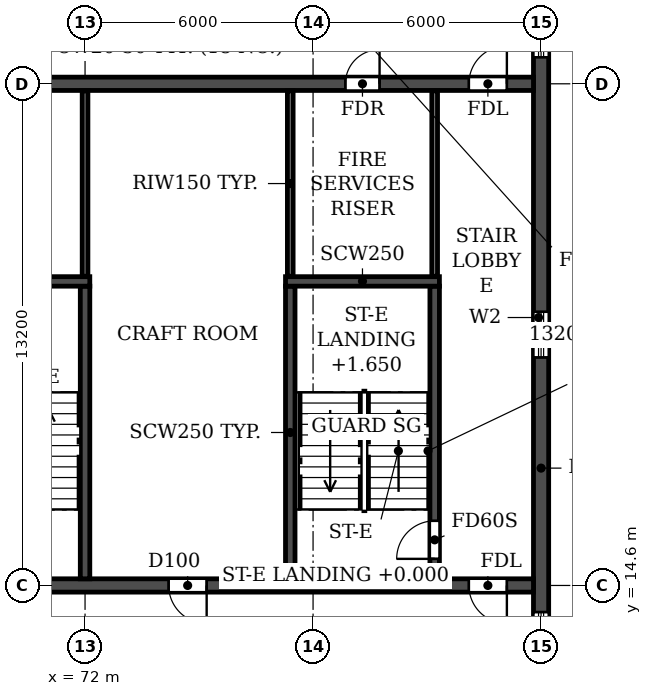
"""IFC4 building model, lengths in metres.
Left out: names, types, materials, properties, quantities, classifications, styles, units other than length and angle.
Written with IfcOpenShell. Run it as: python <this file> out.ifc"""

import sys

from ifc_helpers import new_model, si_unit, direction, frame, frame_2d, origin, place, context, subcontext, project, spatial, rectangle, extrude, element, fill, save


model = new_model("IFC4")
c1 = context("Model", 3, precision=1e-05, world=origin(), true_north=direction((0.0, 1.0)))
c2 = subcontext(c1, "Body", "Model", "MODEL_VIEW")
j1 = project(units=[si_unit("LENGTHUNIT", "METRE"), si_unit("PLANEANGLEUNIT", "RADIAN")], contexts=[c1])
p1 = place(None, origin())
s1 = spatial("IfcSite", under=j1, at=p1, CompositionType="ELEMENT")
p2 = place(p1, origin())
s2 = spatial("IfcBuilding", under=s1, at=p2, CompositionType="ELEMENT")
p3 = place(p2, frame((0.0, 0.0, 257.7)))
s3 = spatial("IfcBuildingStorey", under=s2, at=p3, CompositionType="ELEMENT", Elevation=257.7)
p4 = place(p3, frame((84.0, 4.683, 0.0), z_axis=(0.0, 0.0, 1.0), x_axis=(0.0, 1.0, 0.0)))
e1 = element("IfcWall", 1, at=p4, inside=s3, PredefinedType="SHEAR", context=c2, shape_type="SweptSolid", body=[
    extrude(rectangle(XDim=31.834, YDim=0.4, at=frame_2d((15.917, 0.0))), origin(), (0.0, 0.0, 1.0), 3.0),
])
p5 = place(p4, frame((23.817, 0.0, 0.9)))
e2 = element("IfcOpeningElement", 2, at=p5, cuts=e1, PredefinedType="OPENING", context=c2, shape_type="SweptSolid", body=[
    extrude(rectangle(XDim=1.2, YDim=1.5, at=frame_2d((0.6, 0.75))), frame((0.0, 0.21, 0.0), z_axis=(0.0, -1.0, 0.0), x_axis=(1.0, 0.0, 0.0)), (0.0, 0.0, 1.0), 0.42),
])
p6 = place(p4, frame((8.017, 0.0, 0.9)))
e3 = element("IfcOpeningElement", 3, at=p6, cuts=e1, PredefinedType="OPENING", context=c2, shape_type="SweptSolid", body=[
    extrude(rectangle(XDim=1.2, YDim=1.5, at=frame_2d((0.6, 0.75))), frame((0.0, 0.21, 0.0), z_axis=(0.0, -1.0, 0.0), x_axis=(1.0, 0.0, 0.0)), (0.0, 0.0, 1.0), 0.42),
])
p7 = place(p4, frame((27.694, 0.0, 0.6)))
e4 = element("IfcOpeningElement", 4, at=p7, cuts=e1, PredefinedType="OPENING", context=c2, shape_type="SweptSolid", body=[
    extrude(rectangle(XDim=2.2, YDim=1.8, at=frame_2d((1.1, 0.9))), frame((0.0, 0.21, 0.0), z_axis=(0.0, -1.0, 0.0), x_axis=(1.0, 0.0, 0.0)), (0.0, 0.0, 1.0), 0.42),
])
p8 = place(p4, frame((2.541, 0.0, 0.6)))
e5 = element("IfcOpeningElement", 5, at=p8, cuts=e1, PredefinedType="OPENING", context=c2, shape_type="SweptSolid", body=[
    extrude(rectangle(XDim=2.2, YDim=1.8, at=frame_2d((1.1, 0.9))), frame((0.0, 0.21, 0.0), z_axis=(0.0, -1.0, 0.0), x_axis=(1.0, 0.0, 0.0)), (0.0, 0.0, 1.0), 0.42),
])
p9 = place(p4, frame((15.917, 0.0, 0.9)))
e6 = element("IfcOpeningElement", 6, at=p9, cuts=e1, PredefinedType="OPENING", context=c2, shape_type="SweptSolid", body=[
    extrude(rectangle(XDim=1.2, YDim=1.5, at=frame_2d((0.6, 0.75))), frame((0.0, 0.21, 0.0), z_axis=(0.0, -1.0, 0.0), x_axis=(1.0, 0.0, 0.0)), (0.0, 0.0, 1.0), 0.42),
])
p10 = place(p3, frame((18.2, 14.6, 0.0), z_axis=(0.0, 0.0, 1.0), x_axis=(1.0, 0.0, 0.0)))
e7 = element("IfcWall", 7, at=p10, inside=s3, PredefinedType="SOLIDWALL", context=c2, shape_type="SweptSolid", body=[
    extrude(rectangle(XDim=65.6, YDim=0.35, at=frame_2d((32.8, 0.0))), origin(), (0.0, 0.0, 1.0), 3.0),
])
p11 = place(p10, frame((0.7, 0.0, 0.0)))
e8 = element("IfcOpeningElement", 8, at=p11, cuts=e7, PredefinedType="OPENING", context=c2, shape_type="SweptSolid", body=[
    extrude(rectangle(XDim=1.0, YDim=2.1, at=frame_2d((0.5, 1.05))), frame((0.0, 0.185, 0.0), z_axis=(0.0, -1.0, 0.0), x_axis=(1.0, 0.0, 0.0)), (0.0, 0.0, 1.0), 0.37),
])
p12 = place(p10, frame((8.6, 0.0, 0.0)))
e9 = element("IfcOpeningElement", 9, at=p12, cuts=e7, PredefinedType="OPENING", context=c2, shape_type="SweptSolid", body=[
    extrude(rectangle(XDim=1.0, YDim=2.1, at=frame_2d((0.5, 1.05))), frame((0.0, 0.185, 0.0), z_axis=(0.0, -1.0, 0.0), x_axis=(1.0, 0.0, 0.0)), (0.0, 0.0, 1.0), 0.37),
])
p13 = place(p10, frame((13.2, 0.0, 0.0)))
e10 = element("IfcOpeningElement", 10, at=p13, cuts=e7, PredefinedType="OPENING", context=c2, shape_type="SweptSolid", body=[
    extrude(rectangle(XDim=1.0, YDim=2.1, at=frame_2d((0.5, 1.05))), frame((0.0, 0.185, 0.0), z_axis=(0.0, -1.0, 0.0), x_axis=(1.0, 0.0, 0.0)), (0.0, 0.0, 1.0), 0.37),
])
p14 = place(p10, frame((24.5, 0.0, 0.0)))
e11 = element("IfcOpeningElement", 11, at=p14, cuts=e7, PredefinedType="OPENING", context=c2, shape_type="SweptSolid", body=[
    extrude(rectangle(XDim=1.0, YDim=2.1, at=frame_2d((0.5, 1.05))), frame((0.0, 0.185, 0.0), z_axis=(0.0, -1.0, 0.0), x_axis=(1.0, 0.0, 0.0)), (0.0, 0.0, 1.0), 0.37),
])
p15 = place(p10, frame((28.4, 0.0, 0.0)))
e12 = element("IfcOpeningElement", 12, at=p15, cuts=e7, PredefinedType="OPENING", context=c2, shape_type="SweptSolid", body=[
    extrude(rectangle(XDim=1.0, YDim=2.1, at=frame_2d((0.5, 1.05))), frame((0.0, 0.185, 0.0), z_axis=(0.0, -1.0, 0.0), x_axis=(1.0, 0.0, 0.0)), (0.0, 0.0, 1.0), 0.37),
])
p16 = place(p10, frame((32.3, 0.0, 0.0)))
e13 = element("IfcOpeningElement", 13, at=p16, cuts=e7, PredefinedType="OPENING", context=c2, shape_type="SweptSolid", body=[
    extrude(rectangle(XDim=1.0, YDim=2.1, at=frame_2d((0.5, 1.05))), frame((0.0, 0.185, 0.0), z_axis=(0.0, -1.0, 0.0), x_axis=(1.0, 0.0, 0.0)), (0.0, 0.0, 1.0), 0.37),
])
p17 = place(p10, frame((34.9, 0.0, 0.0)))
e14 = element("IfcOpeningElement", 14, at=p17, cuts=e7, PredefinedType="OPENING", context=c2, shape_type="SweptSolid", body=[
    extrude(rectangle(XDim=1.0, YDim=2.1, at=frame_2d((0.5, 1.05))), frame((0.0, 0.185, 0.0), z_axis=(0.0, -1.0, 0.0), x_axis=(1.0, 0.0, 0.0)), (0.0, 0.0, 1.0), 0.37),
])
p18 = place(p10, frame((38.8, 0.0, 0.0)))
e15 = element("IfcOpeningElement", 15, at=p18, cuts=e7, PredefinedType="OPENING", context=c2, shape_type="SweptSolid", body=[
    extrude(rectangle(XDim=1.0, YDim=2.1, at=frame_2d((0.5, 1.05))), frame((0.0, 0.185, 0.0), z_axis=(0.0, -1.0, 0.0), x_axis=(1.0, 0.0, 0.0)), (0.0, 0.0, 1.0), 0.37),
])
p19 = place(p10, frame((51.4, 0.0, 0.0)))
e16 = element("IfcOpeningElement", 16, at=p19, cuts=e7, PredefinedType="OPENING", context=c2, shape_type="SweptSolid", body=[
    extrude(rectangle(XDim=1.0, YDim=2.1, at=frame_2d((0.5, 1.05))), frame((0.0, 0.185, 0.0), z_axis=(0.0, -1.0, 0.0), x_axis=(1.0, 0.0, 0.0)), (0.0, 0.0, 1.0), 0.37),
])
p20 = place(p10, frame((56.0, 0.0, 0.0)))
e17 = element("IfcOpeningElement", 17, at=p20, cuts=e7, PredefinedType="OPENING", context=c2, shape_type="SweptSolid", body=[
    extrude(rectangle(XDim=1.0, YDim=2.1, at=frame_2d((0.5, 1.05))), frame((0.0, 0.185, 0.0), z_axis=(0.0, -1.0, 0.0), x_axis=(1.0, 0.0, 0.0)), (0.0, 0.0, 1.0), 0.37),
])
p21 = place(p10, frame((63.9, 0.0, 0.0)))
e18 = element("IfcOpeningElement", 18, at=p21, cuts=e7, PredefinedType="OPENING", context=c2, shape_type="SweptSolid", body=[
    extrude(rectangle(XDim=1.0, YDim=2.1, at=frame_2d((0.5, 1.05))), frame((0.0, 0.185, 0.0), z_axis=(0.0, -1.0, 0.0), x_axis=(1.0, 0.0, 0.0)), (0.0, 0.0, 1.0), 0.37),
])
p22 = place(p3, frame((18.2, 27.8, 0.0), z_axis=(0.0, 0.0, 1.0), x_axis=(1.0, 0.0, 0.0)))
e19 = element("IfcWall", 19, at=p22, inside=s3, PredefinedType="SOLIDWALL", context=c2, shape_type="SweptSolid", body=[
    extrude(rectangle(XDim=65.6, YDim=0.35, at=frame_2d((32.8, 0.0))), origin(), (0.0, 0.0, 1.0), 3.0),
])
p23 = place(p22, frame((0.7, 0.0, 0.0)))
e20 = element("IfcOpeningElement", 20, at=p23, cuts=e19, PredefinedType="OPENING", context=c2, shape_type="SweptSolid", body=[
    extrude(rectangle(XDim=1.0, YDim=2.1, at=frame_2d((0.5, 1.05))), frame((0.0, 0.185, 0.0), z_axis=(0.0, -1.0, 0.0), x_axis=(1.0, 0.0, 0.0)), (0.0, 0.0, 1.0), 0.37),
])
p24 = place(p22, frame((4.05, 0.0, 0.0)))
e21 = element("IfcOpeningElement", 21, at=p24, cuts=e19, PredefinedType="OPENING", context=c2, shape_type="SweptSolid", body=[
    extrude(rectangle(XDim=0.9, YDim=2.1, at=frame_2d((0.45, 1.05))), frame((0.0, 0.185, 0.0), z_axis=(0.0, -1.0, 0.0), x_axis=(1.0, 0.0, 0.0)), (0.0, 0.0, 1.0), 0.37),
])
p25 = place(p22, frame((13.25, 0.0, 0.0)))
e22 = element("IfcOpeningElement", 22, at=p25, cuts=e19, PredefinedType="OPENING", context=c2, shape_type="SweptSolid", body=[
    extrude(rectangle(XDim=0.9, YDim=2.1, at=frame_2d((0.45, 1.05))), frame((0.0, 0.185, 0.0), z_axis=(0.0, -1.0, 0.0), x_axis=(1.0, 0.0, 0.0)), (0.0, 0.0, 1.0), 0.37),
])
p26 = place(p22, frame((19.0, 0.0, 0.0)))
e23 = element("IfcOpeningElement", 23, at=p26, cuts=e19, PredefinedType="OPENING", context=c2, shape_type="SweptSolid", body=[
    extrude(rectangle(XDim=1.0, YDim=2.1, at=frame_2d((0.5, 1.05))), frame((0.0, 0.185, 0.0), z_axis=(0.0, -1.0, 0.0), x_axis=(1.0, 0.0, 0.0)), (0.0, 0.0, 1.0), 0.37),
])
p27 = place(p22, frame((24.2, 0.0, 0.0)))
e24 = element("IfcOpeningElement", 24, at=p27, cuts=e19, PredefinedType="OPENING", context=c2, shape_type="SweptSolid", body=[
    extrude(rectangle(XDim=1.0, YDim=2.1, at=frame_2d((0.5, 1.05))), frame((0.0, 0.185, 0.0), z_axis=(0.0, -1.0, 0.0), x_axis=(1.0, 0.0, 0.0)), (0.0, 0.0, 1.0), 0.37),
])
p28 = place(p22, frame((29.4, 0.0, 0.0)))
e25 = element("IfcOpeningElement", 25, at=p28, cuts=e19, PredefinedType="OPENING", context=c2, shape_type="SweptSolid", body=[
    extrude(rectangle(XDim=1.0, YDim=2.1, at=frame_2d((0.5, 1.05))), frame((0.0, 0.185, 0.0), z_axis=(0.0, -1.0, 0.0), x_axis=(1.0, 0.0, 0.0)), (0.0, 0.0, 1.0), 0.37),
])
p29 = place(p22, frame((32.3, 0.0, 0.0)))
e26 = element("IfcOpeningElement", 26, at=p29, cuts=e19, PredefinedType="OPENING", context=c2, shape_type="SweptSolid", body=[
    extrude(rectangle(XDim=1.0, YDim=2.1, at=frame_2d((0.5, 1.05))), frame((0.0, 0.185, 0.0), z_axis=(0.0, -1.0, 0.0), x_axis=(1.0, 0.0, 0.0)), (0.0, 0.0, 1.0), 0.37),
])
p30 = place(p22, frame((36.5, 0.0, 0.0)))
e27 = element("IfcOpeningElement", 27, at=p30, cuts=e19, PredefinedType="OPENING", context=c2, shape_type="SweptSolid", body=[
    extrude(rectangle(XDim=1.0, YDim=2.1, at=frame_2d((0.5, 1.05))), frame((0.0, 0.185, 0.0), z_axis=(0.0, -1.0, 0.0), x_axis=(1.0, 0.0, 0.0)), (0.0, 0.0, 1.0), 0.37),
])
p31 = place(p22, frame((40.4, 0.0, 0.0)))
e28 = element("IfcOpeningElement", 28, at=p31, cuts=e19, PredefinedType="OPENING", context=c2, shape_type="SweptSolid", body=[
    extrude(rectangle(XDim=1.0, YDim=2.1, at=frame_2d((0.5, 1.05))), frame((0.0, 0.185, 0.0), z_axis=(0.0, -1.0, 0.0), x_axis=(1.0, 0.0, 0.0)), (0.0, 0.0, 1.0), 0.37),
])
p32 = place(p22, frame((43.0, 0.0, 0.0)))
e29 = element("IfcOpeningElement", 29, at=p32, cuts=e19, PredefinedType="OPENING", context=c2, shape_type="SweptSolid", body=[
    extrude(rectangle(XDim=1.0, YDim=2.1, at=frame_2d((0.5, 1.05))), frame((0.0, 0.185, 0.0), z_axis=(0.0, -1.0, 0.0), x_axis=(1.0, 0.0, 0.0)), (0.0, 0.0, 1.0), 0.37),
])
p33 = place(p22, frame((46.65, 0.0, 0.0)))
e30 = element("IfcOpeningElement", 30, at=p33, cuts=e19, PredefinedType="OPENING", context=c2, shape_type="SweptSolid", body=[
    extrude(rectangle(XDim=1.5, YDim=2.1, at=frame_2d((0.75, 1.05))), frame((0.0, 0.185, 0.0), z_axis=(0.0, -1.0, 0.0), x_axis=(1.0, 0.0, 0.0)), (0.0, 0.0, 1.0), 0.37),
])
p34 = place(p22, frame((51.45, 0.0, 0.0)))
e31 = element("IfcOpeningElement", 31, at=p34, cuts=e19, PredefinedType="OPENING", context=c2, shape_type="SweptSolid", body=[
    extrude(rectangle(XDim=0.9, YDim=2.1, at=frame_2d((0.45, 1.05))), frame((0.0, 0.185, 0.0), z_axis=(0.0, -1.0, 0.0), x_axis=(1.0, 0.0, 0.0)), (0.0, 0.0, 1.0), 0.37),
])
p35 = place(p22, frame((60.65, 0.0, 0.0)))
e32 = element("IfcOpeningElement", 32, at=p35, cuts=e19, PredefinedType="OPENING", context=c2, shape_type="SweptSolid", body=[
    extrude(rectangle(XDim=0.9, YDim=2.1, at=frame_2d((0.45, 1.05))), frame((0.0, 0.185, 0.0), z_axis=(0.0, -1.0, 0.0), x_axis=(1.0, 0.0, 0.0)), (0.0, 0.0, 1.0), 0.37),
])
p36 = place(p22, frame((63.9, 0.0, 0.0)))
e33 = element("IfcOpeningElement", 33, at=p36, cuts=e19, PredefinedType="OPENING", context=c2, shape_type="SweptSolid", body=[
    extrude(rectangle(XDim=1.0, YDim=2.1, at=frame_2d((0.5, 1.05))), frame((0.0, 0.185, 0.0), z_axis=(0.0, -1.0, 0.0), x_axis=(1.0, 0.0, 0.0)), (0.0, 0.0, 1.0), 0.37),
])
p37 = place(p3, frame((72.0, 14.775, 0.0), z_axis=(0.0, 0.0, 1.0), x_axis=(0.0, 1.0, 0.0)))
e34 = element("IfcWall", 34, at=p37, inside=s3, PredefinedType="SOLIDWALL", context=c2, shape_type="SweptSolid", body=[
    extrude(rectangle(XDim=7.7, YDim=0.25, at=frame_2d((3.85, 0.0))), origin(), (0.0, 0.0, 1.0), 3.0),
])
p38 = place(p3, frame((68.075, 22.6, 0.0), z_axis=(0.0, 0.0, 1.0), x_axis=(1.0, 0.0, 0.0)))
e35 = element("IfcWall", 35, at=p38, inside=s3, PredefinedType="SOLIDWALL", context=c2, shape_type="SweptSolid", body=[
    extrude(rectangle(XDim=4.05, YDim=0.25, at=frame_2d((2.025, 0.0))), origin(), (0.0, 0.0, 1.0), 3.0),
])
p39 = place(p3, frame((77.4, 14.775, 0.0), z_axis=(0.0, 0.0, 1.0), x_axis=(0.0, 1.0, 0.0)))
e36 = element("IfcWall", 36, at=p39, inside=s3, PredefinedType="SOLIDWALL", context=c2, shape_type="SweptSolid", body=[
    extrude(rectangle(XDim=7.7, YDim=0.25, at=frame_2d((3.85, 0.0))), origin(), (0.0, 0.0, 1.0), 3.0),
])
p40 = place(p3, frame((81.2, 14.775, 0.0), z_axis=(0.0, 0.0, 1.0), x_axis=(0.0, 1.0, 0.0)))
e37 = element("IfcWall", 37, at=p40, inside=s3, PredefinedType="SOLIDWALL", context=c2, shape_type="SweptSolid", body=[
    extrude(rectangle(XDim=7.7, YDim=0.25, at=frame_2d((3.85, 0.0))), origin(), (0.0, 0.0, 1.0), 3.0),
])
p41 = place(p40, frame((0.525, 0.0, 0.0)))
e38 = element("IfcOpeningElement", 38, at=p41, cuts=e37, PredefinedType="OPENING", context=c2, shape_type="SweptSolid", body=[
    extrude(rectangle(XDim=1.0, YDim=2.1, at=frame_2d((0.5, 1.05))), frame((0.0, 0.135, 0.0), z_axis=(0.0, -1.0, 0.0), x_axis=(1.0, 0.0, 0.0)), (0.0, 0.0, 1.0), 0.27),
])
p42 = place(p3, frame((77.275, 22.6, 0.0), z_axis=(0.0, 0.0, 1.0), x_axis=(1.0, 0.0, 0.0)))
e39 = element("IfcWall", 39, at=p42, inside=s3, PredefinedType="SOLIDWALL", context=c2, shape_type="SweptSolid", body=[
    extrude(rectangle(XDim=4.05, YDim=0.25, at=frame_2d((2.025, 0.0))), origin(), (0.0, 0.0, 1.0), 3.0),
])
for number, where, z_axis, x_axis in (
    (40, (72.0, 22.735, 0.0), (0.0, 0.0, 1.0), (0.0, 1.0, 0.0)),
    (41, (77.4, 22.735, 0.0), (0.0, 0.0, 1.0), (0.0, 1.0, 0.0)),
    (42, (81.2, 22.735, 0.0), (0.0, 0.0, 1.0), (0.0, 1.0, 0.0)),
):
    element("IfcWall", number, at=place(p3, frame(where, z_axis=z_axis, x_axis=x_axis)), inside=s3, PredefinedType="PARTITIONING", context=c2, shape_type="SweptSolid", body=[
        extrude(rectangle(XDim=4.88, YDim=0.15, at=frame_2d((2.44, 0.0))), origin(), (0.0, 0.0, 1.0), 3.0),
    ])
p43 = place(p5, origin())
e43 = element("IfcWindow", 43, at=p43, inside=s3, PartitioningType="SINGLE_PANEL", PredefinedType="WINDOW", context=c2, shape_type="SweptSolid", body=[
    extrude(rectangle(XDim=1.2, YDim=1.5, at=frame_2d((0.6, 0.75))), frame((0.0, 0.03, 0.0), z_axis=(0.0, -1.0, 0.0), x_axis=(1.0, 0.0, 0.0)), (0.0, 0.0, 1.0), 0.06),
])
fill(e2, e43)
p44 = place(p6, origin())
e44 = element("IfcWindow", 44, at=p44, inside=s3, PartitioningType="SINGLE_PANEL", PredefinedType="WINDOW", context=c2, shape_type="SweptSolid", body=[
    extrude(rectangle(XDim=1.2, YDim=1.5, at=frame_2d((0.6, 0.75))), frame((0.0, 0.03, 0.0), z_axis=(0.0, -1.0, 0.0), x_axis=(1.0, 0.0, 0.0)), (0.0, 0.0, 1.0), 0.06),
])
fill(e3, e44)
p45 = place(p9, origin())
e45 = element("IfcWindow", 45, at=p45, inside=s3, PartitioningType="SINGLE_PANEL", PredefinedType="WINDOW", context=c2, shape_type="SweptSolid", body=[
    extrude(rectangle(XDim=1.2, YDim=1.5, at=frame_2d((0.6, 0.75))), frame((0.0, 0.03, 0.0), z_axis=(0.0, -1.0, 0.0), x_axis=(1.0, 0.0, 0.0)), (0.0, 0.0, 1.0), 0.06),
])
fill(e6, e45)
p46 = place(p35, origin())
e46 = element("IfcDoor", 46, at=p46, inside=s3, OperationType="SINGLE_SWING_RIGHT", PredefinedType="DOOR", context=c2, shape_type="SweptSolid", body=[
    extrude(rectangle(XDim=0.9, YDim=2.1, at=frame_2d((0.45, 1.05))), frame((0.0, 0.025, 0.0), z_axis=(0.0, -1.0, 0.0), x_axis=(1.0, 0.0, 0.0)), (0.0, 0.0, 1.0), 0.05),
])
fill(e32, e46)
p47 = place(p36, origin())
e47 = element("IfcDoor", 47, at=p47, inside=s3, OperationType="SINGLE_SWING_RIGHT", PredefinedType="DOOR", context=c2, shape_type="SweptSolid", body=[
    extrude(rectangle(XDim=1.0, YDim=2.1, at=frame_2d((0.5, 1.05))), frame((0.0, 0.025, 0.0), z_axis=(0.0, -1.0, 0.0), x_axis=(1.0, 0.0, 0.0)), (0.0, 0.0, 1.0), 0.05),
])
fill(e33, e47)
p48 = place(p20, frame((1.0, 0.0, 0.0), z_axis=(0.0, 0.0, 1.0), x_axis=(-1.0, 0.0, 0.0)))
e48 = element("IfcDoor", 48, at=p48, inside=s3, OperationType="SINGLE_SWING_LEFT", PredefinedType="DOOR", context=c2, shape_type="SweptSolid", body=[
    extrude(rectangle(XDim=1.0, YDim=2.1, at=frame_2d((0.5, 1.05))), frame((0.0, 0.025, 0.0), z_axis=(0.0, -1.0, 0.0), x_axis=(1.0, 0.0, 0.0)), (0.0, 0.0, 1.0), 0.05),
])
fill(e17, e48)
p49 = place(p21, frame((1.0, 0.0, 0.0), z_axis=(0.0, 0.0, 1.0), x_axis=(-1.0, 0.0, 0.0)))
e49 = element("IfcDoor", 49, at=p49, inside=s3, OperationType="SINGLE_SWING_LEFT", PredefinedType="DOOR", context=c2, shape_type="SweptSolid", body=[
    extrude(rectangle(XDim=1.0, YDim=2.1, at=frame_2d((0.5, 1.05))), frame((0.0, 0.025, 0.0), z_axis=(0.0, -1.0, 0.0), x_axis=(1.0, 0.0, 0.0)), (0.0, 0.0, 1.0), 0.05),
])
fill(e18, e49)
p50 = place(p41, origin())
e50 = element("IfcDoor", 50, at=p50, inside=s3, OperationType="SINGLE_SWING_LEFT", PredefinedType="DOOR", context=c2, shape_type="SweptSolid", body=[
    extrude(rectangle(XDim=1.0, YDim=2.1, at=frame_2d((0.5, 1.05))), frame((0.0, 0.025, 0.0), z_axis=(0.0, -1.0, 0.0), x_axis=(1.0, 0.0, 0.0)), (0.0, 0.0, 1.0), 0.05),
])
fill(e38, e50)
save(model, sys.argv[1])
